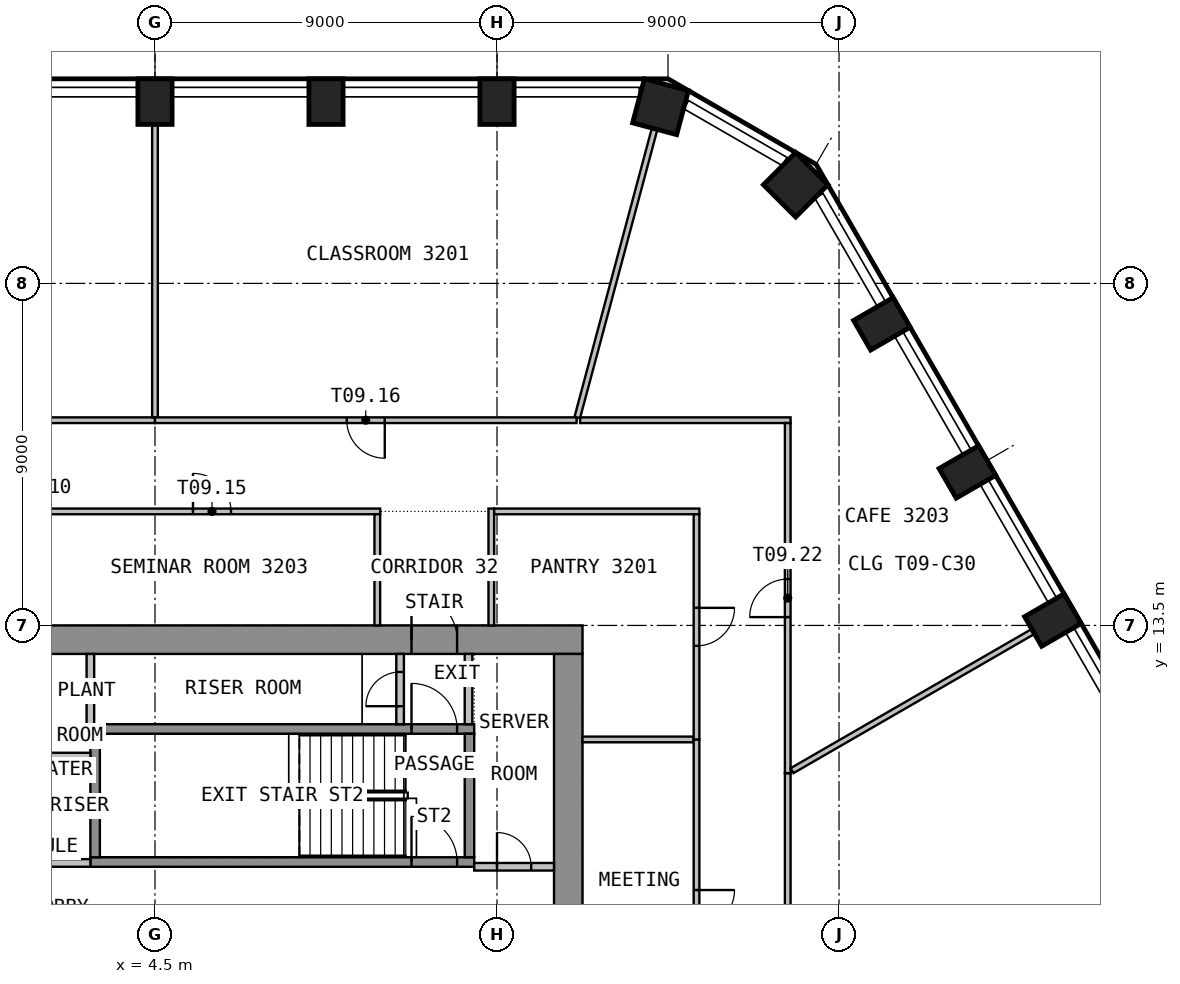
"""IFC4 building model, lengths in metres.
Left out: names, types, materials, properties, quantities, classifications, styles, units other than length and angle.
Written with IfcOpenShell. Run it as: python <this file> out.ifc"""

import sys

from ifc_helpers import new_model, si_unit, direction, frame, frame_2d, origin, origin_2d, place, context, subcontext, project, spatial, rectangle, extrude, element, fill, save


model = new_model("IFC4")
c1 = context("Model", 3, precision=1e-05, world=origin(), true_north=direction((0.0, 1.0)))
c2 = subcontext(c1, "Body", "Model", "MODEL_VIEW")
j1 = project(units=[si_unit("LENGTHUNIT", "METRE"), si_unit("PLANEANGLEUNIT", "RADIAN")], contexts=[c1])
p1 = place(None, origin())
s1 = spatial("IfcSite", under=j1, at=p1, CompositionType="ELEMENT")
p2 = place(p1, origin())
s2 = spatial("IfcBuilding", under=s1, at=p2, CompositionType="ELEMENT")
p3 = place(p2, frame((0.0, 0.0, 132.6)))
s3 = spatial("IfcBuildingStorey", under=s2, at=p3, CompositionType="ELEMENT", Elevation=132.6)
for number, where, z_axis, x_axis in (
    (1, (28.127, 13.641, 0.0), (0.0, 0.0, 1.0), (-0.5, 0.866, 0.0)),
    (2, (25.877, 17.539, 0.0), (0.0, 0.0, 1.0), (-0.5, 0.866, 0.0)),
    (3, (23.627, 21.436, 0.0), (0.0, 0.0, 1.0), (-0.5, 0.866, 0.0)),
):
    element("IfcColumn", number, at=place(p3, frame(where, z_axis=z_axis, x_axis=x_axis)), inside=s3, PredefinedType="COLUMN", context=c2, shape_type="SweptSolid", body=[
        extrude(rectangle(XDim=0.9, YDim=1.2, at=origin_2d()), origin(), (0.0, 0.0, 1.0), 3.575),
    ])
for number, where, z_axis, x_axis in (
    (4, (21.359, 25.095, 0.0), (0.0, 0.0, 1.0), (-0.707, 0.707, 0.0)),
    (5, (17.803, 27.148, 0.0), (0.0, 0.0, 1.0), (-0.966, 0.259, 0.0)),
):
    element("IfcColumn", number, at=place(p3, frame(where, z_axis=z_axis, x_axis=x_axis)), inside=s3, PredefinedType="COLUMN", context=c2, shape_type="SweptSolid", body=[
        extrude(rectangle(XDim=1.2, YDim=1.2, at=origin_2d()), origin(), (0.0, 0.0, 1.0), 3.575),
    ])
for number, where, z_axis, x_axis in (
    (6, (13.5, 27.283, 0.0), (0.0, 0.0, 1.0), (-1.0, 0.0, 0.0)),
    (7, (9.0, 27.283, 0.0), (0.0, 0.0, 1.0), (-1.0, 0.0, 0.0)),
    (8, (4.5, 27.283, 0.0), (0.0, 0.0, 1.0), (-1.0, 0.0, 0.0)),
):
    element("IfcColumn", number, at=place(p3, frame(where, z_axis=z_axis, x_axis=x_axis)), inside=s3, PredefinedType="COLUMN", context=c2, shape_type="SweptSolid", body=[
        extrude(rectangle(XDim=0.9, YDim=1.2, at=origin_2d()), origin(), (0.0, 0.0, 1.0), 3.575),
    ])
p4 = place(p3, frame((-15.75, 13.125, 0.0), z_axis=(0.0, 0.0, 1.0), x_axis=(1.0, 0.0, 0.0)))
e9 = element("IfcWall", 9, at=p4, inside=s3, PredefinedType="SHEAR", context=c2, shape_type="SweptSolid", body=[
    extrude(rectangle(XDim=31.5, YDim=0.75, at=frame_2d((15.75, 0.0))), origin(), (0.0, 0.0, 1.0), 3.575),
])
p5 = place(p4, frame((14.55, 0.0, 0.0)))
e10 = element("IfcOpeningElement", 10, at=p5, cuts=e9, PredefinedType="OPENING", context=c2, shape_type="SweptSolid", body=[
    extrude(rectangle(XDim=2.4, YDim=2.1, at=frame_2d((1.2, 1.05))), frame((0.0, 0.385, 0.0), z_axis=(0.0, -1.0, 0.0), x_axis=(1.0, 0.0, 0.0)), (0.0, 0.0, 1.0), 0.77),
])
p6 = place(p4, frame((3.3, 0.0, 0.0)))
e11 = element("IfcOpeningElement", 11, at=p6, cuts=e9, PredefinedType="OPENING", context=c2, shape_type="SweptSolid", body=[
    extrude(rectangle(XDim=1.2, YDim=2.1, at=frame_2d((0.6, 1.05))), frame((0.0, 0.385, 0.0), z_axis=(0.0, -1.0, 0.0), x_axis=(1.0, 0.0, 0.0)), (0.0, 0.0, 1.0), 0.77),
])
p7 = place(p4, frame((27.0, 0.0, 0.0)))
e12 = element("IfcOpeningElement", 12, at=p7, cuts=e9, PredefinedType="OPENING", context=c2, shape_type="SweptSolid", body=[
    extrude(rectangle(XDim=1.2, YDim=2.1, at=frame_2d((0.6, 1.05))), frame((0.0, 0.385, 0.0), z_axis=(0.0, -1.0, 0.0), x_axis=(1.0, 0.0, 0.0)), (0.0, 0.0, 1.0), 0.77),
])
p8 = place(p3, frame((15.375, -12.75, 0.0), z_axis=(0.0, 0.0, 1.0), x_axis=(0.0, 1.0, 0.0)))
e13 = element("IfcWall", 13, at=p8, inside=s3, PredefinedType="SHEAR", context=c2, shape_type="SweptSolid", body=[
    extrude(rectangle(XDim=25.5, YDim=0.75, at=frame_2d((12.75, 0.0))), origin(), (0.0, 0.0, 1.0), 3.575),
])
p9 = place(p8, frame((11.55, 0.0, 0.0)))
e14 = element("IfcOpeningElement", 14, at=p9, cuts=e13, PredefinedType="OPENING", context=c2, shape_type="SweptSolid", body=[
    extrude(rectangle(XDim=2.4, YDim=2.1, at=frame_2d((1.2, 1.05))), frame((0.0, 0.385, 0.0), z_axis=(0.0, -1.0, 0.0), x_axis=(1.0, 0.0, 0.0)), (0.0, 0.0, 1.0), 0.77),
])
p10 = place(p3, frame((2.8, 7.275, 0.0), z_axis=(0.0, 0.0, 1.0), x_axis=(1.0, 0.0, 0.0)))
e15 = element("IfcWall", 15, at=p10, inside=s3, PredefinedType="SHEAR", context=c2, shape_type="SweptSolid", body=[
    extrude(rectangle(XDim=10.1, YDim=0.25, at=frame_2d((5.05, 0.0))), origin(), (0.0, 0.0, 1.0), 3.575),
])
p11 = place(p10, frame((8.45, 0.0, 0.0)))
e16 = element("IfcOpeningElement", 16, at=p11, cuts=e15, PredefinedType="OPENING", context=c2, shape_type="SweptSolid", body=[
    extrude(rectangle(XDim=1.2, YDim=2.1, at=frame_2d((0.6, 1.05))), frame((0.0, 0.135, 0.0), z_axis=(0.0, -1.0, 0.0), x_axis=(1.0, 0.0, 0.0)), (0.0, 0.0, 1.0), 0.27),
])
p12 = place(p3, frame((2.8, 10.775, 0.0), z_axis=(0.0, 0.0, 1.0), x_axis=(1.0, 0.0, 0.0)))
e17 = element("IfcWall", 17, at=p12, inside=s3, PredefinedType="SHEAR", context=c2, shape_type="SweptSolid", body=[
    extrude(rectangle(XDim=10.1, YDim=0.25, at=frame_2d((5.05, 0.0))), origin(), (0.0, 0.0, 1.0), 3.575),
])
p13 = place(p12, frame((8.45, 0.0, 0.0)))
e18 = element("IfcOpeningElement", 18, at=p13, cuts=e17, PredefinedType="OPENING", context=c2, shape_type="SweptSolid", body=[
    extrude(rectangle(XDim=1.2, YDim=2.1, at=frame_2d((0.6, 1.05))), frame((0.0, 0.135, 0.0), z_axis=(0.0, -1.0, 0.0), x_axis=(1.0, 0.0, 0.0)), (0.0, 0.0, 1.0), 0.27),
])
for number, where, z_axis, x_axis in (
    (19, (2.925, 7.4, 0.0), (0.0, 0.0, 1.0), (0.0, 1.0, 0.0)),
    (20, (12.775, 7.4, 0.0), (0.0, 0.0, 1.0), (0.0, 1.0, 0.0)),
):
    element("IfcWall", number, at=place(p3, frame(where, z_axis=z_axis, x_axis=x_axis)), inside=s3, PredefinedType="SHEAR", context=c2, shape_type="SweptSolid", body=[
        extrude(rectangle(XDim=3.25, YDim=0.25, at=frame_2d((1.625, 0.0))), origin(), (0.0, 0.0, 1.0), 3.575),
    ])
for number, where, z_axis, x_axis in (
    (21, (1.4, 7.25, 0.0), (0.0, 0.0, 1.0), (1.0, 0.0, 0.0)),
    (22, (1.4, 10.05, 0.0), (0.0, 0.0, 1.0), (1.0, 0.0, 0.0)),
):
    element("IfcWall", number, at=place(p3, frame(where, z_axis=z_axis, x_axis=x_axis)), inside=s3, PredefinedType="PARTITIONING", context=c2, shape_type="SweptSolid", body=[
        extrude(rectangle(XDim=1.4, YDim=0.2, at=frame_2d((0.7, 0.0))), origin(), (0.0, 0.0, 1.0), 3.575),
    ])
p14 = place(p3, frame((12.75, 10.9, 0.0), z_axis=(0.0, 0.0, 1.0), x_axis=(0.0, 1.0, 0.0)))
e23 = element("IfcWall", 23, at=p14, inside=s3, PredefinedType="PARTITIONING", context=c2, shape_type="SweptSolid", body=[
    extrude(rectangle(XDim=1.85, YDim=0.2, at=frame_2d((0.925, 0.0))), origin(), (0.0, 0.0, 1.0), 3.575),
])
p15 = place(p3, frame((10.95, 10.9, 0.0), z_axis=(0.0, 0.0, 1.0), x_axis=(0.0, 1.0, 0.0)))
e24 = element("IfcWall", 24, at=p15, inside=s3, PredefinedType="PARTITIONING", context=c2, shape_type="SweptSolid", body=[
    extrude(rectangle(XDim=1.85, YDim=0.2, at=frame_2d((0.925, 0.0))), origin(), (0.0, 0.0, 1.0), 3.575),
])
p16 = place(p15, frame((0.475, 0.0, 0.0)))
e25 = element("IfcOpeningElement", 25, at=p16, cuts=e24, PredefinedType="OPENING", context=c2, shape_type="SweptSolid", body=[
    extrude(rectangle(XDim=0.9, YDim=2.1, at=frame_2d((0.45, 1.05))), frame((0.0, 0.11, 0.0), z_axis=(0.0, -1.0, 0.0), x_axis=(1.0, 0.0, 0.0)), (0.0, 0.0, 1.0), 0.22),
])
p17 = place(p3, frame((12.9, 7.15, 0.0), z_axis=(0.0, 0.0, 1.0), x_axis=(1.0, 0.0, 0.0)))
e26 = element("IfcWall", 26, at=p17, inside=s3, PredefinedType="PARTITIONING", context=c2, shape_type="SweptSolid", body=[
    extrude(rectangle(XDim=2.1, YDim=0.2, at=frame_2d((1.05, 0.0))), origin(), (0.0, 0.0, 1.0), 3.575),
])
p18 = place(p17, frame((0.6, 0.0, 0.0)))
e27 = element("IfcOpeningElement", 27, at=p18, cuts=e26, PredefinedType="OPENING", context=c2, shape_type="SweptSolid", body=[
    extrude(rectangle(XDim=0.9, YDim=2.1, at=frame_2d((0.45, 1.05))), frame((0.0, 0.11, 0.0), z_axis=(0.0, -1.0, 0.0), x_axis=(1.0, 0.0, 0.0)), (0.0, 0.0, 1.0), 0.22),
])
p19 = place(p3, frame((4.5, 18.9, 0.0), z_axis=(0.0, 0.0, 1.0), x_axis=(-1.0, 0.0, 0.0)))
e28 = element("IfcWall", 28, at=p19, inside=s3, PredefinedType="PARTITIONING", context=c2, shape_type="SweptSolid", body=[
    extrude(rectangle(XDim=18.0, YDim=0.15, at=frame_2d((9.0, 0.0))), origin(), (0.0, 0.0, 1.0), 3.575),
])
p20 = place(p19, frame((8.5, 0.0, 0.0)))
e29 = element("IfcOpeningElement", 29, at=p20, cuts=e28, PredefinedType="OPENING", context=c2, shape_type="SweptSolid", body=[
    extrude(rectangle(XDim=1.0, YDim=2.1, at=frame_2d((0.5, 1.05))), frame((0.0, 0.085, 0.0), z_axis=(0.0, -1.0, 0.0), x_axis=(1.0, 0.0, 0.0)), (0.0, 0.0, 1.0), 0.17),
])
p21 = place(p3, frame((1.575, 16.5, 0.0), z_axis=(0.0, 0.0, 1.0), x_axis=(1.0, 0.0, 0.0)))
e30 = element("IfcWall", 30, at=p21, inside=s3, PredefinedType="PARTITIONING", context=c2, shape_type="SweptSolid", body=[
    extrude(rectangle(XDim=8.85, YDim=0.15, at=frame_2d((4.425, 0.0))), origin(), (0.0, 0.0, 1.0), 3.575),
])
p22 = place(p21, frame((3.925, 0.0, 0.0)))
e31 = element("IfcOpeningElement", 31, at=p22, cuts=e30, PredefinedType="OPENING", context=c2, shape_type="SweptSolid", body=[
    extrude(rectangle(XDim=1.0, YDim=2.1, at=frame_2d((0.5, 1.05))), frame((0.0, 0.085, 0.0), z_axis=(0.0, -1.0, 0.0), x_axis=(1.0, 0.0, 0.0)), (0.0, 0.0, 1.0), 0.17),
])
p23 = place(p3, frame((4.5, 26.663, 0.0), z_axis=(0.0, 0.0, 1.0), x_axis=(0.0, -1.0, 0.0)))
e32 = element("IfcWall", 32, at=p23, inside=s3, PredefinedType="PARTITIONING", context=c2, shape_type="SweptSolid", body=[
    extrude(rectangle(XDim=7.688, YDim=0.15, at=frame_2d((3.844, 0.0))), origin(), (0.0, 0.0, 1.0), 3.575),
])
p24 = place(p3, frame((15.593, 18.9, 0.0), z_axis=(0.0, 0.0, 1.0), x_axis=(-1.0, 0.0, 0.0)))
e33 = element("IfcWall", 33, at=p24, inside=s3, PredefinedType="PARTITIONING", context=c2, shape_type="SweptSolid", body=[
    extrude(rectangle(XDim=11.093, YDim=0.15, at=frame_2d((5.546, 0.0))), origin(), (0.0, 0.0, 1.0), 3.575),
])
p25 = place(p24, frame((5.046, 0.0, 0.0)))
e34 = element("IfcOpeningElement", 34, at=p25, cuts=e33, PredefinedType="OPENING", context=c2, shape_type="SweptSolid", body=[
    extrude(rectangle(XDim=1.0, YDim=2.1, at=frame_2d((0.5, 1.05))), frame((0.0, 0.085, 0.0), z_axis=(0.0, -1.0, 0.0), x_axis=(1.0, 0.0, 0.0)), (0.0, 0.0, 1.0), 0.17),
])
p26 = place(p3, frame((10.35, 16.425, 0.0), z_axis=(0.0, 0.0, 1.0), x_axis=(0.0, -1.0, 0.0)))
e35 = element("IfcWall", 35, at=p26, inside=s3, PredefinedType="PARTITIONING", context=c2, shape_type="SweptSolid", body=[
    extrude(rectangle(XDim=2.925, YDim=0.15, at=frame_2d((1.462, 0.0))), origin(), (0.0, 0.0, 1.0), 3.575),
])
p27 = place(p3, frame((13.35, 13.5, 0.0), z_axis=(0.0, 0.0, 1.0), x_axis=(0.0, 1.0, 0.0)))
e36 = element("IfcWall", 36, at=p27, inside=s3, PredefinedType="PARTITIONING", context=c2, shape_type="SweptSolid", body=[
    extrude(rectangle(XDim=3.075, YDim=0.15, at=frame_2d((1.538, 0.0))), origin(), (0.0, 0.0, 1.0), 3.575),
])
p28 = place(p3, frame((13.425, 16.5, 0.0), z_axis=(0.0, 0.0, 1.0), x_axis=(1.0, 0.0, 0.0)))
e37 = element("IfcWall", 37, at=p28, inside=s3, PredefinedType="PARTITIONING", context=c2, shape_type="SweptSolid", body=[
    extrude(rectangle(XDim=5.4, YDim=0.15, at=frame_2d((2.7, 0.0))), origin(), (0.0, 0.0, 1.0), 3.575),
])
p29 = place(p3, frame((17.643, 26.549, 0.0), z_axis=(0.0, 0.0, 1.0), x_axis=(-0.258869363255, -0.965912342176, 0.0)))
e38 = element("IfcWall", 38, at=p29, inside=s3, PredefinedType="PARTITIONING", context=c2, shape_type="SweptSolid", body=[
    extrude(rectangle(XDim=7.844, YDim=0.15, at=frame_2d((3.922, 0.0))), origin(), (0.0, 0.0, 1.0), 3.575),
])
p30 = place(p3, frame((21.225, 18.9, 0.0), z_axis=(0.0, 0.0, 1.0), x_axis=(-1.0, 0.0, 0.0)))
e39 = element("IfcWall", 39, at=p30, inside=s3, PredefinedType="PARTITIONING", context=c2, shape_type="SweptSolid", body=[
    extrude(rectangle(XDim=5.537, YDim=0.15, at=frame_2d((2.769, 0.0))), origin(), (0.0, 0.0, 1.0), 3.575),
])
p31 = place(p3, frame((18.675, 10.5, 0.0), z_axis=(0.0, 0.0, 1.0), x_axis=(-1.0, 0.0, 0.0)))
e40 = element("IfcWall", 40, at=p31, inside=s3, PredefinedType="PARTITIONING", context=c2, shape_type="SweptSolid", body=[
    extrude(rectangle(XDim=2.925, YDim=0.15, at=frame_2d((1.462, 0.0))), origin(), (0.0, 0.0, 1.0), 3.575),
])
p32 = place(p3, frame((18.75, 10.5, 0.0), z_axis=(0.0, 0.0, 1.0), x_axis=(0.0, -1.0, 0.0)))
e41 = element("IfcWall", 41, at=p32, inside=s3, PredefinedType="PARTITIONING", context=c2, shape_type="SweptSolid", body=[
    extrude(rectangle(XDim=8.925, YDim=0.15, at=frame_2d((4.462, 0.0))), origin(), (0.0, 0.0, 1.0), 3.575),
])
p33 = place(p32, frame((3.962, 0.0, 0.0)))
e42 = element("IfcOpeningElement", 42, at=p33, cuts=e41, PredefinedType="OPENING", context=c2, shape_type="SweptSolid", body=[
    extrude(rectangle(XDim=1.0, YDim=2.1, at=frame_2d((0.5, 1.05))), frame((0.0, 0.085, 0.0), z_axis=(0.0, -1.0, 0.0), x_axis=(1.0, 0.0, 0.0)), (0.0, 0.0, 1.0), 0.17),
])
p34 = place(p3, frame((18.75, 16.425, 0.0), z_axis=(0.0, 0.0, 1.0), x_axis=(0.0, -1.0, 0.0)))
e43 = element("IfcWall", 43, at=p34, inside=s3, PredefinedType="PARTITIONING", context=c2, shape_type="SweptSolid", body=[
    extrude(rectangle(XDim=5.925, YDim=0.15, at=frame_2d((2.962, 0.0))), origin(), (0.0, 0.0, 1.0), 3.575),
])
p35 = place(p34, frame((2.462, 0.0, 0.0)))
e44 = element("IfcOpeningElement", 44, at=p35, cuts=e43, PredefinedType="OPENING", context=c2, shape_type="SweptSolid", body=[
    extrude(rectangle(XDim=1.0, YDim=2.1, at=frame_2d((0.5, 1.05))), frame((0.0, 0.085, 0.0), z_axis=(0.0, -1.0, 0.0), x_axis=(1.0, 0.0, 0.0)), (0.0, 0.0, 1.0), 0.17),
])
p36 = place(p3, frame((21.15, -14.809, 0.0), z_axis=(0.0, 0.0, 1.0), x_axis=(0.0, 1.0, 0.0)))
e45 = element("IfcWall", 45, at=p36, inside=s3, PredefinedType="PARTITIONING", context=c2, shape_type="SweptSolid", body=[
    extrude(rectangle(XDim=24.422, YDim=0.15, at=frame_2d((12.211, 0.0))), origin(), (0.0, 0.0, 1.0), 3.575),
])
p37 = place(p36, frame((11.961, 0.0, 0.0)))
e46 = element("IfcOpeningElement", 46, at=p37, cuts=e45, PredefinedType="OPENING", context=c2, shape_type="SweptSolid", body=[
    extrude(rectangle(XDim=1.0, YDim=2.1, at=frame_2d((0.5, 1.05))), frame((0.0, 0.085, 0.0), z_axis=(0.0, -1.0, 0.0), x_axis=(1.0, 0.0, 0.0)), (0.0, 0.0, 1.0), 0.17),
])
p38 = place(p3, frame((21.15, 9.613, 0.0), z_axis=(0.0, 0.0, 1.0), x_axis=(0.0, 1.0, 0.0)))
e47 = element("IfcWall", 47, at=p38, inside=s3, PredefinedType="PARTITIONING", context=c2, shape_type="SweptSolid", body=[
    extrude(rectangle(XDim=9.212, YDim=0.15, at=frame_2d((4.606, 0.0))), origin(), (0.0, 0.0, 1.0), 3.575),
])
p39 = place(p38, frame((4.106, 0.0, 0.0)))
e48 = element("IfcOpeningElement", 48, at=p39, cuts=e47, PredefinedType="OPENING", context=c2, shape_type="SweptSolid", body=[
    extrude(rectangle(XDim=1.0, YDim=2.1, at=frame_2d((0.5, 1.05))), frame((0.0, 0.085, 0.0), z_axis=(0.0, -1.0, 0.0), x_axis=(1.0, 0.0, 0.0)), (0.0, 0.0, 1.0), 0.17),
])
p40 = place(p3, frame((27.591, 13.331, 0.0), z_axis=(0.0, 0.0, 1.0), x_axis=(-0.866030346483, -0.499991438897, 0.0)))
e49 = element("IfcWall", 49, at=p40, inside=s3, PredefinedType="PARTITIONING", context=c2, shape_type="SweptSolid", body=[
    extrude(rectangle(XDim=7.307, YDim=0.15, at=frame_2d((3.653, 0.0))), origin(), (0.0, 0.0, 1.0), 3.575),
])
p41 = place(p3, frame((2.8, 12.749, 0.0), z_axis=(0.0, 0.0, 1.0), x_axis=(0.0, -1.0, 0.0)))
e50 = element("IfcWall", 50, at=p41, inside=s3, PredefinedType="PARTITIONING", context=c2, shape_type="SweptSolid", body=[
    extrude(rectangle(XDim=1.848, YDim=0.2, at=frame_2d((0.924, 0.0))), origin(), (0.0, 0.0, 1.0), 3.575),
])
p42 = place(p7, origin())
e51 = element("IfcDoor", 51, at=p42, inside=s3, OperationType="SINGLE_SWING_RIGHT", PredefinedType="DOOR", context=c2, shape_type="SweptSolid", body=[
    extrude(rectangle(XDim=1.2, YDim=2.1, at=frame_2d((0.6, 1.05))), frame((0.0, 0.025, 0.0), z_axis=(0.0, -1.0, 0.0), x_axis=(1.0, 0.0, 0.0)), (0.0, 0.0, 1.0), 0.05),
])
fill(e12, e51)
p43 = place(p11, origin())
e52 = element("IfcDoor", 52, at=p43, inside=s3, OperationType="SINGLE_SWING_LEFT", PredefinedType="DOOR", context=c2, shape_type="SweptSolid", body=[
    extrude(rectangle(XDim=1.2, YDim=2.1, at=frame_2d((0.6, 1.05))), frame((0.0, 0.025, 0.0), z_axis=(0.0, -1.0, 0.0), x_axis=(1.0, 0.0, 0.0)), (0.0, 0.0, 1.0), 0.05),
])
fill(e16, e52)
p44 = place(p13, origin())
e53 = element("IfcDoor", 53, at=p44, inside=s3, OperationType="SINGLE_SWING_RIGHT", PredefinedType="DOOR", context=c2, shape_type="SweptSolid", body=[
    extrude(rectangle(XDim=1.2, YDim=2.1, at=frame_2d((0.6, 1.05))), frame((0.0, 0.025, 0.0), z_axis=(0.0, -1.0, 0.0), x_axis=(1.0, 0.0, 0.0)), (0.0, 0.0, 1.0), 0.05),
])
fill(e18, e53)
p45 = place(p16, origin())
e54 = element("IfcDoor", 54, at=p45, inside=s3, OperationType="SINGLE_SWING_LEFT", PredefinedType="DOOR", context=c2, shape_type="SweptSolid", body=[
    extrude(rectangle(XDim=0.9, YDim=2.1, at=frame_2d((0.45, 1.05))), frame((0.0, 0.025, 0.0), z_axis=(0.0, -1.0, 0.0), x_axis=(1.0, 0.0, 0.0)), (0.0, 0.0, 1.0), 0.05),
])
fill(e25, e54)
p46 = place(p18, origin())
e55 = element("IfcDoor", 55, at=p46, inside=s3, OperationType="SINGLE_SWING_LEFT", PredefinedType="DOOR", context=c2, shape_type="SweptSolid", body=[
    extrude(rectangle(XDim=0.9, YDim=2.1, at=frame_2d((0.45, 1.05))), frame((0.0, 0.025, 0.0), z_axis=(0.0, -1.0, 0.0), x_axis=(1.0, 0.0, 0.0)), (0.0, 0.0, 1.0), 0.05),
])
fill(e27, e55)
p47 = place(p22, origin())
e56 = element("IfcDoor", 56, at=p47, inside=s3, OperationType="SINGLE_SWING_RIGHT", PredefinedType="DOOR", context=c2, shape_type="SweptSolid", body=[
    extrude(rectangle(XDim=1.0, YDim=2.1, at=frame_2d((0.5, 1.05))), frame((0.0, 0.025, 0.0), z_axis=(0.0, -1.0, 0.0), x_axis=(1.0, 0.0, 0.0)), (0.0, 0.0, 1.0), 0.05),
])
fill(e31, e56)
p48 = place(p25, origin())
e57 = element("IfcDoor", 57, at=p48, inside=s3, OperationType="SINGLE_SWING_LEFT", PredefinedType="DOOR", context=c2, shape_type="SweptSolid", body=[
    extrude(rectangle(XDim=1.0, YDim=2.1, at=frame_2d((0.5, 1.05))), frame((0.0, 0.025, 0.0), z_axis=(0.0, -1.0, 0.0), x_axis=(1.0, 0.0, 0.0)), (0.0, 0.0, 1.0), 0.05),
])
fill(e34, e57)
p49 = place(p35, origin())
e58 = element("IfcDoor", 58, at=p49, inside=s3, OperationType="SINGLE_SWING_LEFT", PredefinedType="DOOR", context=c2, shape_type="SweptSolid", body=[
    extrude(rectangle(XDim=1.0, YDim=2.1, at=frame_2d((0.5, 1.05))), frame((0.0, 0.025, 0.0), z_axis=(0.0, -1.0, 0.0), x_axis=(1.0, 0.0, 0.0)), (0.0, 0.0, 1.0), 0.05),
])
fill(e44, e58)
p50 = place(p33, origin())
e59 = element("IfcDoor", 59, at=p50, inside=s3, OperationType="SINGLE_SWING_RIGHT", PredefinedType="DOOR", context=c2, shape_type="SweptSolid", body=[
    extrude(rectangle(XDim=1.0, YDim=2.1, at=frame_2d((0.5, 1.05))), frame((0.0, 0.025, 0.0), z_axis=(0.0, -1.0, 0.0), x_axis=(1.0, 0.0, 0.0)), (0.0, 0.0, 1.0), 0.05),
])
fill(e42, e59)
p51 = place(p39, origin())
e60 = element("IfcDoor", 60, at=p51, inside=s3, OperationType="SINGLE_SWING_RIGHT", PredefinedType="DOOR", context=c2, shape_type="SweptSolid", body=[
    extrude(rectangle(XDim=1.0, YDim=2.1, at=frame_2d((0.5, 1.05))), frame((0.0, 0.025, 0.0), z_axis=(0.0, -1.0, 0.0), x_axis=(1.0, 0.0, 0.0)), (0.0, 0.0, 1.0), 0.05),
])
fill(e48, e60)
save(model, sys.argv[1])
